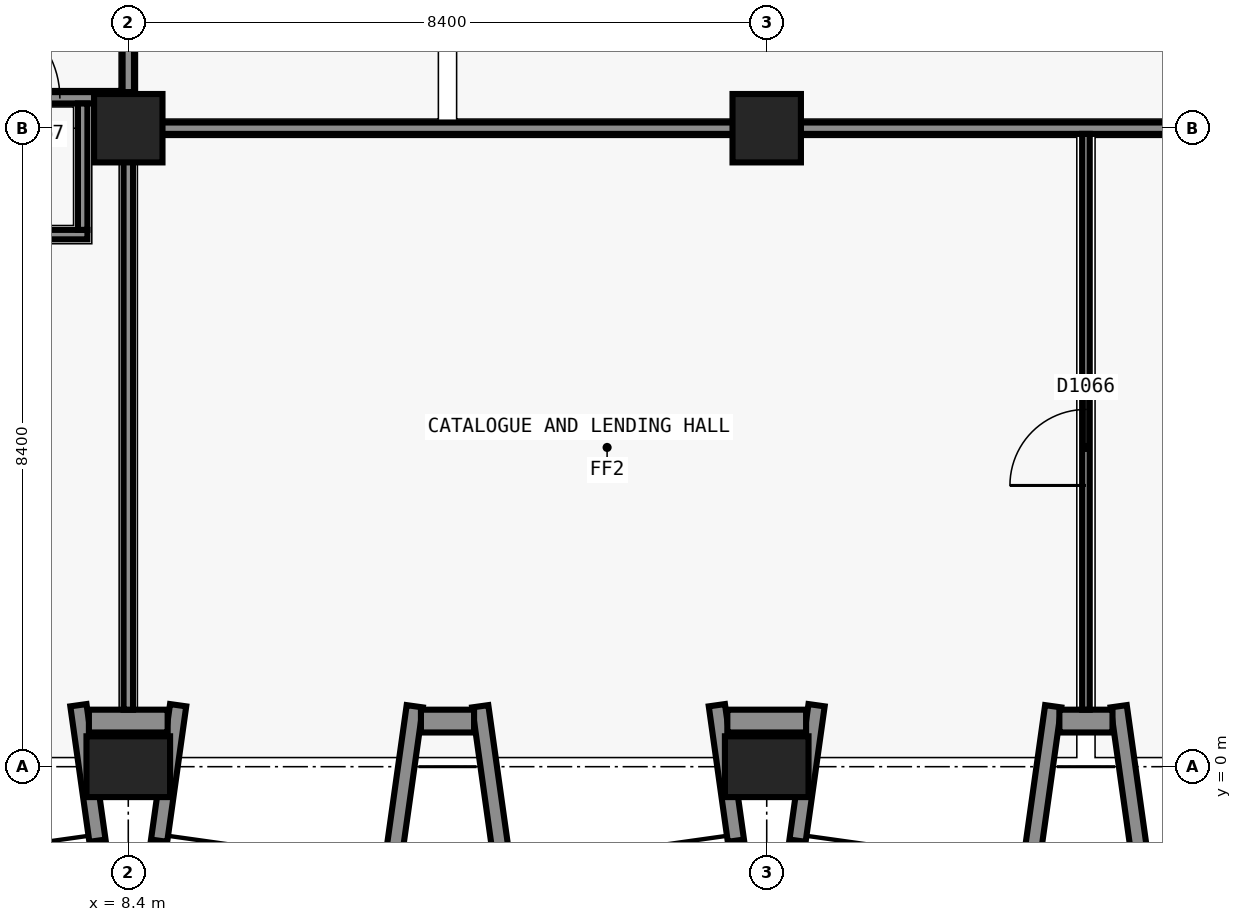
"""IFC4 building model, lengths in metres.
Left out: names, types, materials, properties, quantities, classifications, styles, units other than length and angle.
Written with IfcOpenShell. Run it as: python <this file> out.ifc"""

import sys

from ifc_helpers import new_model, si_unit, direction, frame, frame_2d, origin, origin_2d, place, context, subcontext, project, spatial, rectangle, extrude, element, fill, save


model = new_model("IFC4")
c1 = context("Model", 3, precision=1e-05, world=origin(), true_north=direction((0.0, 1.0)))
c2 = subcontext(c1, "Body", "Model", "MODEL_VIEW")
j1 = project(units=[si_unit("LENGTHUNIT", "METRE"), si_unit("PLANEANGLEUNIT", "RADIAN")], contexts=[c1])
p1 = place(None, origin())
s1 = spatial("IfcSite", under=j1, at=p1, CompositionType="ELEMENT")
p2 = place(p1, origin())
s2 = spatial("IfcBuilding", under=s1, at=p2, CompositionType="ELEMENT")
p3 = place(p2, frame((0.0, 0.0, 5.4)))
s3 = spatial("IfcBuildingStorey", under=s2, at=p3, CompositionType="ELEMENT", Elevation=5.4)
p4 = place(p3, frame((8.4, 0.0, 0.0), z_axis=(0.0, 0.0, 1.0), x_axis=(1.0, 0.0, 0.0)))
e1 = element("IfcColumn", 1, at=p4, inside=s3, PredefinedType="COLUMN", context=c2, shape_type="SweptSolid", body=[
    extrude(rectangle(XDim=1.1, YDim=0.8, at=origin_2d()), origin(), (0.0, 0.0, 1.0), 4.8),
])
p5 = place(p3, frame((8.4, 8.4, 0.0), z_axis=(0.0, 0.0, 1.0), x_axis=(1.0, 0.0, 0.0)))
e2 = element("IfcColumn", 2, at=p5, inside=s3, PredefinedType="COLUMN", context=c2, shape_type="SweptSolid", body=[
    extrude(rectangle(XDim=0.9, YDim=0.9, at=origin_2d()), origin(), (0.0, 0.0, 1.0), 4.8),
])
p6 = place(p3, frame((16.8, 0.0, 0.0), z_axis=(0.0, 0.0, 1.0), x_axis=(1.0, 0.0, 0.0)))
e3 = element("IfcColumn", 3, at=p6, inside=s3, PredefinedType="COLUMN", context=c2, shape_type="SweptSolid", body=[
    extrude(rectangle(XDim=1.1, YDim=0.8, at=origin_2d()), origin(), (0.0, 0.0, 1.0), 4.8),
])
p7 = place(p3, frame((16.8, 8.4, 0.0), z_axis=(0.0, 0.0, 1.0), x_axis=(1.0, 0.0, 0.0)))
e4 = element("IfcColumn", 4, at=p7, inside=s3, PredefinedType="COLUMN", context=c2, shape_type="SweptSolid", body=[
    extrude(rectangle(XDim=0.9, YDim=0.9, at=origin_2d()), origin(), (0.0, 0.0, 1.0), 4.8),
])
for number, where, z_axis, x_axis in (
    (5, (7.744, 0.809, 0.0), (0.0, 0.0, 1.0), (0.139, -0.99, 0.0)),
    (6, (9.056, 0.809, 0.0), (0.0, 0.0, 1.0), (-0.139, -0.99, 0.0)),
):
    element("IfcWall", number, at=place(p3, frame(where, z_axis=z_axis, x_axis=x_axis)), inside=s3, PredefinedType="SOLIDWALL", context=c2, shape_type="SweptSolid", body=[
        extrude(rectangle(XDim=1.8, YDim=0.215, at=frame_2d((0.9, 0.0))), origin(), (0.0, 0.0, 1.0), 4.5),
    ])
p8 = place(p3, frame((12.169, 0.795, 0.0), z_axis=(0.0, 0.0, 1.0), x_axis=(-0.139141913905, -0.990272451295, 0.0)))
e7 = element("IfcWall", 7, at=p8, inside=s3, PredefinedType="SOLIDWALL", context=c2, shape_type="SweptSolid", body=[
    extrude(rectangle(XDim=2.219, YDim=0.215, at=frame_2d((1.11, 0.0))), origin(), (0.0, 0.0, 1.0), 4.5),
])
p9 = place(p3, frame((13.031, 0.795, 0.0), z_axis=(0.0, 0.0, 1.0), x_axis=(0.139249775508, -0.99025728981, 0.0)))
e8 = element("IfcWall", 8, at=p9, inside=s3, PredefinedType="SOLIDWALL", context=c2, shape_type="SweptSolid", body=[
    extrude(rectangle(XDim=2.22, YDim=0.215, at=frame_2d((1.11, 0.0))), origin(), (0.0, 0.0, 1.0), 4.5),
])
for number, where, z_axis, x_axis in (
    (9, (16.144, 0.809, 0.0), (0.0, 0.0, 1.0), (0.139, -0.99, 0.0)),
    (10, (17.456, 0.809, 0.0), (0.0, 0.0, 1.0), (-0.139, -0.99, 0.0)),
):
    element("IfcWall", number, at=place(p3, frame(where, z_axis=z_axis, x_axis=x_axis)), inside=s3, PredefinedType="SOLIDWALL", context=c2, shape_type="SweptSolid", body=[
        extrude(rectangle(XDim=1.8, YDim=0.215, at=frame_2d((0.9, 0.0))), origin(), (0.0, 0.0, 1.0), 4.5),
    ])
for number, where, z_axis, x_axis in (
    (11, (20.569, 0.795, 0.0), (0.0, 0.0, 1.0), (-0.139, -0.99, 0.0)),
    (12, (21.431, 0.795, 0.0), (0.0, 0.0, 1.0), (0.139, -0.99, 0.0)),
):
    element("IfcWall", number, at=place(p3, frame(where, z_axis=z_axis, x_axis=x_axis)), inside=s3, PredefinedType="SOLIDWALL", context=c2, shape_type="SweptSolid", body=[
        extrude(rectangle(XDim=2.219, YDim=0.215, at=frame_2d((1.11, 0.0))), origin(), (0.0, 0.0, 1.0), 4.5),
    ])
p10 = place(p3, frame((8.918, 0.6, 0.0), z_axis=(0.0, 0.0, 1.0), x_axis=(-1.0, 0.0, 0.0)))
e13 = element("IfcWall", 13, at=p10, inside=s3, PredefinedType="SOLIDWALL", context=c2, shape_type="SweptSolid", body=[
    extrude(rectangle(XDim=1.036, YDim=0.3, at=frame_2d((0.518, 0.0))), origin(), (0.0, 0.0, 1.0), 4.5),
])
p11 = place(p3, frame((12.949, 0.6, 0.0), z_axis=(0.0, 0.0, 1.0), x_axis=(-1.0, 0.0, 0.0)))
e14 = element("IfcWall", 14, at=p11, inside=s3, PredefinedType="SOLIDWALL", context=c2, shape_type="SweptSolid", body=[
    extrude(rectangle(XDim=0.699, YDim=0.3, at=frame_2d((0.35, 0.0))), origin(), (0.0, 0.0, 1.0), 4.5),
])
p12 = place(p3, frame((17.318, 0.6, 0.0), z_axis=(0.0, 0.0, 1.0), x_axis=(-1.0, 0.0, 0.0)))
e15 = element("IfcWall", 15, at=p12, inside=s3, PredefinedType="SOLIDWALL", context=c2, shape_type="SweptSolid", body=[
    extrude(rectangle(XDim=1.036, YDim=0.3, at=frame_2d((0.518, 0.0))), origin(), (0.0, 0.0, 1.0), 4.5),
])
p13 = place(p3, frame((21.35, 0.6, 0.0), z_axis=(0.0, 0.0, 1.0), x_axis=(-1.0, 0.0, 0.0)))
e16 = element("IfcWall", 16, at=p13, inside=s3, PredefinedType="SOLIDWALL", context=c2, shape_type="SweptSolid", body=[
    extrude(rectangle(XDim=0.699, YDim=0.3, at=frame_2d((0.35, 0.0))), origin(), (0.0, 0.0, 1.0), 4.5),
])
p14 = place(p3, frame((8.325, 8.4, 0.0), z_axis=(0.0, 0.0, 1.0), x_axis=(1.0, 0.0, 0.0)))
e17 = element("IfcWall", 17, at=p14, inside=s3, PredefinedType="PARTITIONING", context=c2, shape_type="SweptSolid", body=[
    extrude(rectangle(XDim=19.175, YDim=0.15, at=frame_2d((9.587, 0.0))), origin(), (0.0, 0.0, 1.0), 3.8),
])
p15 = place(p3, frame((6.1, 8.8, 0.0), z_axis=(0.0, 0.0, 1.0), x_axis=(1.0, 0.0, 0.0)))
e18 = element("IfcWall", 18, at=p15, inside=s3, PredefinedType="SOLIDWALL", context=c2, shape_type="SweptSolid", body=[
    extrude(rectangle(XDim=2.375, YDim=0.15, at=frame_2d((1.188, 0.0))), origin(), (0.0, 0.0, 1.0), 3.8),
])
p16 = place(p15, frame((0.2, 0.0, 0.0)))
e19 = element("IfcOpeningElement", 19, at=p16, cuts=e18, PredefinedType="OPENING", context=c2, shape_type="SweptSolid", body=[
    extrude(rectangle(XDim=1.2, YDim=2.1, at=frame_2d((0.6, 1.05))), frame((0.0, 0.085, 0.0), z_axis=(0.0, -1.0, 0.0), x_axis=(1.0, 0.0, 0.0)), (0.0, 0.0, 1.0), 0.17),
])
p17 = place(p3, frame((8.4, 8.475, 0.0), z_axis=(0.0, 0.0, 1.0), x_axis=(0.0, 1.0, 0.0)))
e20 = element("IfcWall", 20, at=p17, inside=s3, PredefinedType="PARTITIONING", context=c2, shape_type="SweptSolid", body=[
    extrude(rectangle(XDim=0.25, YDim=0.15, at=frame_2d((0.125, 0.0))), origin(), (0.0, 0.0, 1.0), 3.8),
])
p18 = place(p3, frame((8.4, 8.875, 0.0), z_axis=(0.0, 0.0, 1.0), x_axis=(0.0, 1.0, 0.0)))
e21 = element("IfcWall", 21, at=p18, inside=s3, PredefinedType="SOLIDWALL", context=c2, shape_type="SweptSolid", body=[
    extrude(rectangle(XDim=2.85, YDim=0.15, at=frame_2d((1.425, 0.0))), origin(), (0.0, 0.0, 1.0), 3.8),
])
p19 = place(p3, frame((6.1, 7.0, 0.0), z_axis=(0.0, 0.0, 1.0), x_axis=(1.0, 0.0, 0.0)))
e22 = element("IfcWall", 22, at=p19, inside=s3, PredefinedType="PARTITIONING", context=c2, shape_type="SweptSolid", body=[
    extrude(rectangle(XDim=1.762, YDim=0.125, at=frame_2d((0.881, 0.0))), origin(), (0.0, 0.0, 1.0), 4.5),
])
p20 = place(p3, frame((7.8, 7.062, 0.0), z_axis=(0.0, 0.0, 1.0), x_axis=(0.0, 1.0, 0.0)))
e23 = element("IfcWall", 23, at=p20, inside=s3, PredefinedType="PARTITIONING", context=c2, shape_type="SweptSolid", body=[
    extrude(rectangle(XDim=1.663, YDim=0.125, at=frame_2d((0.831, 0.0))), origin(), (0.0, 0.0, 1.0), 4.0),
])
p21 = place(p3, frame((8.4, 0.75, 0.0), z_axis=(0.0, 0.0, 1.0), x_axis=(0.0, 1.0, 0.0)))
e24 = element("IfcWall", 24, at=p21, inside=s3, PredefinedType="PARTITIONING", context=c2, shape_type="SweptSolid", body=[
    extrude(rectangle(XDim=7.575, YDim=0.125, at=frame_2d((3.788, 0.0))), origin(), (0.0, 0.0, 1.0), 3.8),
])
p22 = place(p3, frame((21.0, 0.75, 0.0), z_axis=(0.0, 0.0, 1.0), x_axis=(0.0, 1.0, 0.0)))
e25 = element("IfcWall", 25, at=p22, inside=s3, PredefinedType="PARTITIONING", context=c2, shape_type="SweptSolid", body=[
    extrude(rectangle(XDim=7.575, YDim=0.1, at=frame_2d((3.788, 0.0))), origin(), (0.0, 0.0, 1.0), 3.8),
])
p23 = place(p22, frame((2.95, 0.0, 0.0)))
e26 = element("IfcOpeningElement", 26, at=p23, cuts=e25, PredefinedType="OPENING", context=c2, shape_type="SweptSolid", body=[
    extrude(rectangle(XDim=1.0, YDim=2.1, at=frame_2d((0.5, 1.05))), frame((0.0, 0.06, 0.0), z_axis=(0.0, -1.0, 0.0), x_axis=(1.0, 0.0, 0.0)), (0.0, 0.0, 1.0), 0.12),
])
p24 = place(p23, origin())
e27 = element("IfcDoor", 27, at=p24, inside=s3, OperationType="SINGLE_SWING_RIGHT", PredefinedType="DOOR", context=c2, shape_type="SweptSolid", body=[
    extrude(rectangle(XDim=1.0, YDim=2.1, at=frame_2d((0.5, 1.05))), frame((0.0, 0.025, 0.0), z_axis=(0.0, -1.0, 0.0), x_axis=(1.0, 0.0, 0.0)), (0.0, 0.0, 1.0), 0.05),
])
fill(e26, e27)
p25 = place(p16, origin())
e28 = element("IfcDoor", 28, at=p25, inside=s3, OperationType="SINGLE_SWING_RIGHT", PredefinedType="DOOR", context=c2, shape_type="SweptSolid", body=[
    extrude(rectangle(XDim=1.2, YDim=2.1, at=frame_2d((0.6, 1.05))), frame((0.0, 0.025, 0.0), z_axis=(0.0, -1.0, 0.0), x_axis=(1.0, 0.0, 0.0)), (0.0, 0.0, 1.0), 0.05),
])
fill(e19, e28)
save(model, sys.argv[1])
